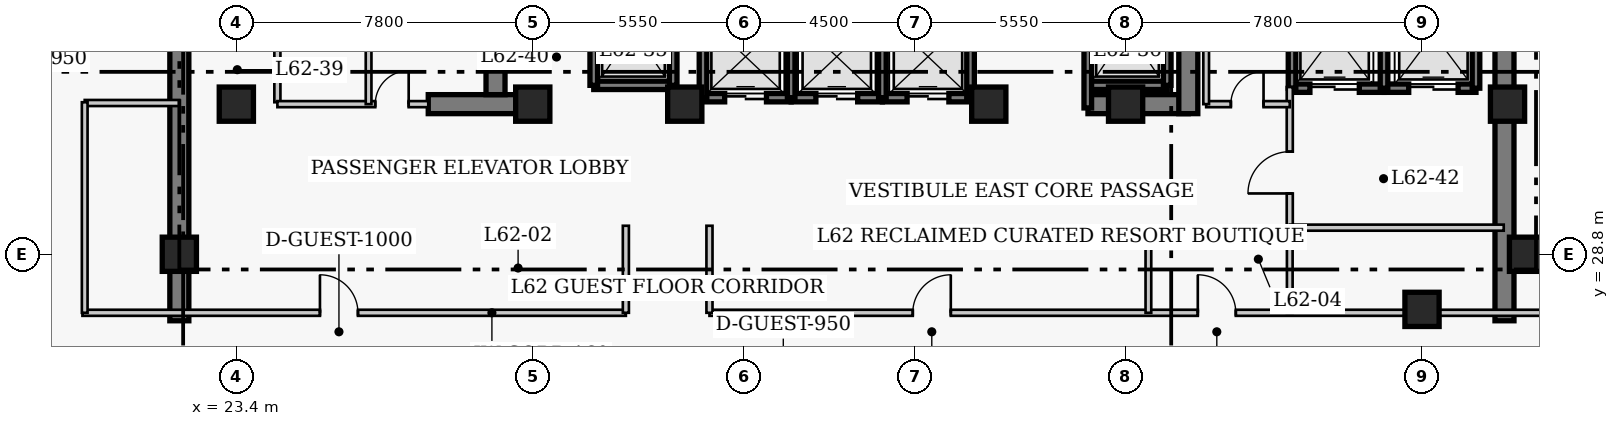
"""IFC4 building model, lengths in metres.
Left out: names, types, materials, properties, quantities, classifications, styles, units other than length and angle.
Written with IfcOpenShell. Run it as: python <this file> out.ifc"""

import sys

from ifc_helpers import new_model, si_unit, direction, frame, frame_2d, origin, origin_2d, place, context, subcontext, project, spatial, rectangle, extrude, element, fill, save


model = new_model("IFC4")
c1 = context("Model", 3, precision=1e-05, world=origin(), true_north=direction((0.0, 1.0)))
c2 = subcontext(c1, "Body", "Model", "MODEL_VIEW")
j1 = project(units=[si_unit("LENGTHUNIT", "METRE"), si_unit("PLANEANGLEUNIT", "RADIAN")], contexts=[c1])
p1 = place(None, origin())
s1 = spatial("IfcSite", under=j1, at=p1, CompositionType="ELEMENT")
p2 = place(p1, origin())
s2 = spatial("IfcBuilding", under=s1, at=p2, CompositionType="ELEMENT")
p3 = place(p2, frame((0.0, 0.0, 249.4)))
s3 = spatial("IfcBuildingStorey", under=s2, at=p3, CompositionType="ELEMENT", Elevation=249.4)
for number, where, z_axis, x_axis in (
    (1, (21.9, 27.05, 0.0), (0.0, 0.0, 1.0), (0.0, 1.0, 0.0)),
    (2, (56.77, 27.05, 0.0), (0.0, 0.0, 1.0), (0.0, 1.0, 0.0)),
):
    element("IfcWall", number, at=place(p3, frame(where, z_axis=z_axis, x_axis=x_axis)), inside=s3, PredefinedType="SHEAR", context=c2, shape_type="SweptSolid", body=[
        extrude(rectangle(XDim=13.52, YDim=0.5, at=frame_2d((6.76, 0.0))), origin(), (0.0, 0.0, 1.0), 4.0),
    ])
p4 = place(p3, frame((28.45, 32.75, 0.0), z_axis=(0.0, 0.0, 1.0), x_axis=(1.0, 0.0, 0.0)))
e3 = element("IfcWall", 3, at=p4, inside=s3, PredefinedType="SHEAR", context=c2, shape_type="SweptSolid", body=[
    extrude(rectangle(XDim=2.4, YDim=0.5, at=frame_2d((1.2, 0.0))), origin(), (0.0, 0.0, 1.0), 4.0),
])
p5 = place(p3, frame((45.81, 32.75, 0.0), z_axis=(0.0, 0.0, 1.0), x_axis=(1.0, 0.0, 0.0)))
e4 = element("IfcWall", 4, at=p5, inside=s3, PredefinedType="SHEAR", context=c2, shape_type="SweptSolid", body=[
    extrude(rectangle(XDim=2.64, YDim=0.5, at=frame_2d((1.32, 0.0))), origin(), (0.0, 0.0, 1.0), 4.0),
])
p6 = place(p3, frame((30.22, 33.0, 0.0), z_axis=(0.0, 0.0, 1.0), x_axis=(0.0, 1.0, 0.0)))
e5 = element("IfcWall", 5, at=p6, inside=s3, PredefinedType="SHEAR", context=c2, shape_type="SweptSolid", body=[
    extrude(rectangle(XDim=7.32, YDim=0.5, at=frame_2d((3.66, 0.0))), origin(), (0.0, 0.0, 1.0), 4.0),
])
p7 = place(p3, frame((48.45, 32.5, 0.0), z_axis=(0.0, 0.0, 1.0), x_axis=(0.0, 1.0, 0.0)))
e6 = element("IfcWall", 6, at=p7, inside=s3, PredefinedType="SHEAR", context=c2, shape_type="SweptSolid", body=[
    extrude(rectangle(XDim=7.82, YDim=0.5, at=frame_2d((3.91, 0.0))), origin(), (0.0, 0.0, 1.0), 4.0),
])
p8 = place(p7, frame((5.7, 0.0, 0.0)))
e7 = element("IfcOpeningElement", 7, at=p8, cuts=e6, PredefinedType="OPENING", context=c2, shape_type="SweptSolid", body=[
    extrude(rectangle(XDim=1.1, YDim=2.15, at=frame_2d((0.55, 1.075))), frame((0.0, 0.26, 0.0), z_axis=(0.0, -1.0, 0.0), x_axis=(1.0, 0.0, 0.0)), (0.0, 0.0, 1.0), 0.52),
])
for number, where, z_axis, x_axis in (
    (8, (21.9, 28.8, 0.0), (0.0, 0.0, 1.0), (1.0, 0.0, 0.0)),
    (9, (57.35, 28.8, 0.0), (0.0, 0.0, 1.0), (1.0, 0.0, 0.0)),
    (10, (23.4, 32.75, 0.0), (0.0, 0.0, 1.0), (1.0, 0.0, 0.0)),
    (11, (31.2, 32.75, 0.0), (0.0, 0.0, 1.0), (1.0, 0.0, 0.0)),
    (12, (35.2, 32.75, 0.0), (0.0, 0.0, 1.0), (1.0, 0.0, 0.0)),
    (13, (43.2, 32.75, 0.0), (0.0, 0.0, 1.0), (1.0, 0.0, 0.0)),
    (14, (46.8, 32.75, 0.0), (0.0, 0.0, 1.0), (1.0, 0.0, 0.0)),
    (15, (54.6, 27.35, 0.0), (0.0, 0.0, 1.0), (1.0, 0.0, 0.0)),
    (16, (56.85, 32.75, 0.0), (0.0, 0.0, 1.0), (1.0, 0.0, 0.0)),
):
    element("IfcColumn", number, at=place(p3, frame(where, z_axis=z_axis, x_axis=x_axis)), inside=s3, PredefinedType="COLUMN", context=c2, shape_type="SweptSolid", body=[
        extrude(rectangle(XDim=0.9, YDim=0.9, at=origin_2d()), origin(), (0.0, 0.0, 1.0), 4.0),
    ])
p9 = place(p3, frame((35.68, 32.92, 0.0), z_axis=(0.0, 0.0, 1.0), x_axis=(1.0, 0.0, 0.0)))
e17 = element("IfcWall", 17, at=p9, inside=s3, PredefinedType="SHEAR", context=c2, shape_type="SweptSolid", body=[
    extrude(rectangle(XDim=2.32, YDim=0.22, at=frame_2d((1.16, 0.0))), origin(), (0.0, 0.0, 1.0), 4.0),
])
p10 = place(p9, frame((0.57, 0.0, 0.0)))
e18 = element("IfcOpeningElement", 18, at=p10, cuts=e17, PredefinedType="OPENING", context=c2, shape_type="SweptSolid", body=[
    extrude(rectangle(XDim=1.1, YDim=2.15, at=frame_2d((0.55, 1.075))), frame((0.0, 0.12, 0.0), z_axis=(0.0, -1.0, 0.0), x_axis=(1.0, 0.0, 0.0)), (0.0, 0.0, 1.0), 0.24),
])
p11 = place(p3, frame((35.68, 32.92, 0.0), z_axis=(0.0, 0.0, 1.0), x_axis=(0.0, 1.0, 0.0)))
e19 = element("IfcWall", 19, at=p11, inside=s3, PredefinedType="SHEAR", context=c2, shape_type="SweptSolid", body=[
    extrude(rectangle(XDim=2.16, YDim=0.2, at=frame_2d((1.08, 0.0))), origin(), (0.0, 0.0, 1.0), 4.0),
])
p12 = place(p3, frame((38.0, 32.92, 0.0), z_axis=(0.0, 0.0, 1.0), x_axis=(1.0, 0.0, 0.0)))
e20 = element("IfcWall", 20, at=p12, inside=s3, PredefinedType="SHEAR", context=c2, shape_type="SweptSolid", body=[
    extrude(rectangle(XDim=2.4, YDim=0.22, at=frame_2d((1.2, 0.0))), origin(), (0.0, 0.0, 1.0), 4.0),
])
p13 = place(p12, frame((0.65, 0.0, 0.0)))
e21 = element("IfcOpeningElement", 21, at=p13, cuts=e20, PredefinedType="OPENING", context=c2, shape_type="SweptSolid", body=[
    extrude(rectangle(XDim=1.1, YDim=2.15, at=frame_2d((0.55, 1.075))), frame((0.0, 0.12, 0.0), z_axis=(0.0, -1.0, 0.0), x_axis=(1.0, 0.0, 0.0)), (0.0, 0.0, 1.0), 0.24),
])
p14 = place(p3, frame((38.0, 32.92, 0.0), z_axis=(0.0, 0.0, 1.0), x_axis=(0.0, 1.0, 0.0)))
e22 = element("IfcWall", 22, at=p14, inside=s3, PredefinedType="SHEAR", context=c2, shape_type="SweptSolid", body=[
    extrude(rectangle(XDim=2.16, YDim=0.2, at=frame_2d((1.08, 0.0))), origin(), (0.0, 0.0, 1.0), 4.0),
])
p15 = place(p3, frame((40.4, 32.92, 0.0), z_axis=(0.0, 0.0, 1.0), x_axis=(1.0, 0.0, 0.0)))
e23 = element("IfcWall", 23, at=p15, inside=s3, PredefinedType="SHEAR", context=c2, shape_type="SweptSolid", body=[
    extrude(rectangle(XDim=2.32, YDim=0.22, at=frame_2d((1.16, 0.0))), origin(), (0.0, 0.0, 1.0), 4.0),
])
p16 = place(p15, frame((0.65, 0.0, 0.0)))
e24 = element("IfcOpeningElement", 24, at=p16, cuts=e23, PredefinedType="OPENING", context=c2, shape_type="SweptSolid", body=[
    extrude(rectangle(XDim=1.1, YDim=2.15, at=frame_2d((0.55, 1.075))), frame((0.0, 0.12, 0.0), z_axis=(0.0, -1.0, 0.0), x_axis=(1.0, 0.0, 0.0)), (0.0, 0.0, 1.0), 0.24),
])
for number, where, z_axis, x_axis in (
    (25, (40.4, 32.92, 0.0), (0.0, 0.0, 1.0), (0.0, 1.0, 0.0)),
    (26, (42.72, 32.92, 0.0), (0.0, 0.0, 1.0), (0.0, 1.0, 0.0)),
):
    element("IfcWall", number, at=place(p3, frame(where, z_axis=z_axis, x_axis=x_axis)), inside=s3, PredefinedType="SHEAR", context=c2, shape_type="SweptSolid", body=[
        extrude(rectangle(XDim=2.16, YDim=0.2, at=frame_2d((1.08, 0.0))), origin(), (0.0, 0.0, 1.0), 4.0),
    ])
p17 = place(p3, frame((51.18, 33.17, 0.0), z_axis=(0.0, 0.0, 1.0), x_axis=(1.0, 0.0, 0.0)))
e27 = element("IfcWall", 27, at=p17, inside=s3, PredefinedType="SHEAR", context=c2, shape_type="SweptSolid", body=[
    extrude(rectangle(XDim=2.42, YDim=0.22, at=frame_2d((1.21, 0.0))), origin(), (0.0, 0.0, 1.0), 4.0),
])
p18 = place(p17, frame((0.47, 0.0, 0.0)))
e28 = element("IfcOpeningElement", 28, at=p18, cuts=e27, PredefinedType="OPENING", context=c2, shape_type="SweptSolid", body=[
    extrude(rectangle(XDim=1.3, YDim=2.15, at=frame_2d((0.65, 1.075))), frame((0.0, 0.12, 0.0), z_axis=(0.0, -1.0, 0.0), x_axis=(1.0, 0.0, 0.0)), (0.0, 0.0, 1.0), 0.24),
])
p19 = place(p3, frame((51.18, 33.17, 0.0), z_axis=(0.0, 0.0, 1.0), x_axis=(0.0, 1.0, 0.0)))
e29 = element("IfcWall", 29, at=p19, inside=s3, PredefinedType="SHEAR", context=c2, shape_type="SweptSolid", body=[
    extrude(rectangle(XDim=2.86, YDim=0.2, at=frame_2d((1.43, 0.0))), origin(), (0.0, 0.0, 1.0), 4.0),
])
p20 = place(p3, frame((53.6, 33.17, 0.0), z_axis=(0.0, 0.0, 1.0), x_axis=(1.0, 0.0, 0.0)))
e30 = element("IfcWall", 30, at=p20, inside=s3, PredefinedType="SHEAR", context=c2, shape_type="SweptSolid", body=[
    extrude(rectangle(XDim=2.42, YDim=0.22, at=frame_2d((1.21, 0.0))), origin(), (0.0, 0.0, 1.0), 4.0),
])
p21 = place(p20, frame((0.65, 0.0, 0.0)))
e31 = element("IfcOpeningElement", 31, at=p21, cuts=e30, PredefinedType="OPENING", context=c2, shape_type="SweptSolid", body=[
    extrude(rectangle(XDim=1.3, YDim=2.15, at=frame_2d((0.65, 1.075))), frame((0.0, 0.12, 0.0), z_axis=(0.0, -1.0, 0.0), x_axis=(1.0, 0.0, 0.0)), (0.0, 0.0, 1.0), 0.24),
])
for number, where, z_axis, x_axis in (
    (32, (53.6, 33.17, 0.0), (0.0, 0.0, 1.0), (0.0, 1.0, 0.0)),
    (33, (56.02, 33.17, 0.0), (0.0, 0.0, 1.0), (0.0, 1.0, 0.0)),
):
    element("IfcWall", number, at=place(p3, frame(where, z_axis=z_axis, x_axis=x_axis)), inside=s3, PredefinedType="SHEAR", context=c2, shape_type="SweptSolid", body=[
        extrude(rectangle(XDim=2.86, YDim=0.2, at=frame_2d((1.43, 0.0))), origin(), (0.0, 0.0, 1.0), 4.0),
    ])
p22 = place(p3, frame((32.805, 33.245, 0.0), z_axis=(0.0, 0.0, 1.0), x_axis=(1.0, 0.0, 0.0)))
e34 = element("IfcWall", 34, at=p22, inside=s3, PredefinedType="SHEAR", context=c2, shape_type="SweptSolid", body=[
    extrude(rectangle(XDim=2.09, YDim=0.22, at=frame_2d((1.045, 0.0))), origin(), (0.0, 0.0, 1.0), 4.0),
])
for number, where, z_axis, x_axis in (
    (35, (32.805, 33.245, 0.0), (0.0, 0.0, 1.0), (0.0, 1.0, 0.0)),
    (36, (34.895, 33.245, 0.0), (0.0, 0.0, 1.0), (0.0, 1.0, 0.0)),
):
    element("IfcWall", number, at=place(p3, frame(where, z_axis=z_axis, x_axis=x_axis)), inside=s3, PredefinedType="SHEAR", context=c2, shape_type="SweptSolid", body=[
        extrude(rectangle(XDim=2.91, YDim=0.2, at=frame_2d((1.455, 0.0))), origin(), (0.0, 0.0, 1.0), 4.0),
    ])
p23 = place(p3, frame((45.805, 33.245, 0.0), z_axis=(0.0, 0.0, 1.0), x_axis=(1.0, 0.0, 0.0)))
e37 = element("IfcWall", 37, at=p23, inside=s3, PredefinedType="SHEAR", context=c2, shape_type="SweptSolid", body=[
    extrude(rectangle(XDim=2.09, YDim=0.22, at=frame_2d((1.045, 0.0))), origin(), (0.0, 0.0, 1.0), 4.0),
])
p24 = place(p3, frame((45.805, 32.65, 0.0), z_axis=(0.0, 0.0, 1.0), x_axis=(0.0, 1.0, 0.0)))
e38 = element("IfcWall", 38, at=p24, inside=s3, PredefinedType="SHEAR", context=c2, shape_type="SweptSolid", body=[
    extrude(rectangle(XDim=3.505, YDim=0.2, at=frame_2d((1.752, 0.0))), origin(), (0.0, 0.0, 1.0), 4.0),
])
p25 = place(p3, frame((47.895, 33.245, 0.0), z_axis=(0.0, 0.0, 1.0), x_axis=(0.0, 1.0, 0.0)))
e39 = element("IfcWall", 39, at=p25, inside=s3, PredefinedType="SHEAR", context=c2, shape_type="SweptSolid", body=[
    extrude(rectangle(XDim=2.91, YDim=0.2, at=frame_2d((1.455, 0.0))), origin(), (0.0, 0.0, 1.0), 4.0),
])
p26 = place(p3, frame((24.48, 32.8, 0.0), z_axis=(0.0, 0.0, 1.0), x_axis=(0.0, 1.0, 0.0)))
e40 = element("IfcWall", 40, at=p26, inside=s3, PredefinedType="PARTITIONING", context=c2, shape_type="SweptSolid", body=[
    extrude(rectangle(XDim=3.57, YDim=0.16, at=frame_2d((1.785, 0.0))), origin(), (0.0, 0.0, 1.0), 3.76),
])
p27 = place(p26, frame((1.604, 0.0, 0.0)))
e41 = element("IfcOpeningElement", 41, at=p27, cuts=e40, PredefinedType="OPENING", context=c2, shape_type="SweptSolid", body=[
    extrude(rectangle(XDim=0.9, YDim=2.1, at=frame_2d((0.45, 1.05))), frame((0.0, 0.09, 0.0), z_axis=(0.0, -1.0, 0.0), x_axis=(1.0, 0.0, 0.0)), (0.0, 0.0, 1.0), 0.18),
])
p28 = place(p3, frame((51.12, 29.5, 0.0), z_axis=(0.0, 0.0, 1.0), x_axis=(0.0, 1.0, 0.0)))
e42 = element("IfcWall", 42, at=p28, inside=s3, PredefinedType="PARTITIONING", context=c2, shape_type="SweptSolid", body=[
    extrude(rectangle(XDim=3.7, YDim=0.16, at=frame_2d((1.85, 0.0))), origin(), (0.0, 0.0, 1.0), 3.76),
])
p29 = place(p28, frame((0.9, 0.0, 0.0)))
e43 = element("IfcOpeningElement", 43, at=p29, cuts=e42, PredefinedType="OPENING", context=c2, shape_type="SweptSolid", body=[
    extrude(rectangle(XDim=1.1, YDim=2.15, at=frame_2d((0.55, 1.075))), frame((0.0, 0.09, 0.0), z_axis=(0.0, -1.0, 0.0), x_axis=(1.0, 0.0, 0.0)), (0.0, 0.0, 1.0), 0.18),
])
p30 = place(p3, frame((51.12, 29.5, 0.0), z_axis=(0.0, 0.0, 1.0), x_axis=(1.0, 0.0, 0.0)))
e44 = element("IfcWall", 44, at=p30, inside=s3, PredefinedType="PARTITIONING", context=c2, shape_type="SweptSolid", body=[
    extrude(rectangle(XDim=5.63, YDim=0.16, at=frame_2d((2.815, 0.0))), origin(), (0.0, 0.0, 1.0), 3.76),
])
p31 = place(p3, frame((24.48, 32.75, 0.0), z_axis=(0.0, 0.0, 1.0), x_axis=(1.0, 0.0, 0.0)))
e45 = element("IfcWall", 45, at=p31, inside=s3, PredefinedType="PARTITIONING", context=c2, shape_type="SweptSolid", body=[
    extrude(rectangle(XDim=3.97, YDim=0.16, at=frame_2d((1.985, 0.0))), origin(), (0.0, 0.0, 1.0), 3.76),
])
p32 = place(p31, frame((2.575, 0.0, 0.0)))
e46 = element("IfcOpeningElement", 46, at=p32, cuts=e45, PredefinedType="OPENING", context=c2, shape_type="SweptSolid", body=[
    extrude(rectangle(XDim=0.88, YDim=2.05, at=frame_2d((0.44, 1.025))), frame((0.0, 0.09, 0.0), z_axis=(0.0, -1.0, 0.0), x_axis=(1.0, 0.0, 0.0)), (0.0, 0.0, 1.0), 0.18),
])
p33 = place(p3, frame((48.92, 32.75, 0.0), z_axis=(0.0, 0.0, 1.0), x_axis=(1.0, 0.0, 0.0)))
e47 = element("IfcWall", 47, at=p33, inside=s3, PredefinedType="PARTITIONING", context=c2, shape_type="SweptSolid", body=[
    extrude(rectangle(XDim=2.2, YDim=0.16, at=frame_2d((1.1, 0.0))), origin(), (0.0, 0.0, 1.0), 3.76),
])
p34 = place(p33, frame((0.65, 0.0, 0.0)))
e48 = element("IfcOpeningElement", 48, at=p34, cuts=e47, PredefinedType="OPENING", context=c2, shape_type="SweptSolid", body=[
    extrude(rectangle(XDim=0.86, YDim=2.05, at=frame_2d((0.43, 1.025))), frame((0.0, 0.09, 0.0), z_axis=(0.0, -1.0, 0.0), x_axis=(1.0, 0.0, 0.0)), (0.0, 0.0, 1.0), 0.18),
])
for number, where, z_axis, x_axis in (
    (49, (48.92, 32.75, 0.0), (0.0, 0.0, 1.0), (0.0, 1.0, 0.0)),
    (50, (26.88, 32.75, 0.0), (0.0, 0.0, 1.0), (0.0, 1.0, 0.0)),
):
    element("IfcWall", number, at=place(p3, frame(where, z_axis=z_axis, x_axis=x_axis)), inside=s3, PredefinedType="PARTITIONING", context=c2, shape_type="SweptSolid", body=[
        extrude(rectangle(XDim=3.62, YDim=0.15, at=frame_2d((1.81, 0.0))), origin(), (0.0, 0.0, 1.0), 3.76),
    ])
p35 = place(p3, frame((19.35, 27.26, 0.0), z_axis=(0.0, 0.0, 1.0), x_axis=(1.0, 0.0, 0.0)))
e51 = element("IfcWall", 51, at=p35, inside=s3, PredefinedType="PARTITIONING", context=c2, shape_type="SweptSolid", body=[
    extrude(rectangle(XDim=14.3, YDim=0.16, at=frame_2d((7.15, 0.0))), origin(), (0.0, 0.0, 1.0), 3.76),
])
p36 = place(p35, frame((6.25, 0.0, 0.0)))
e52 = element("IfcOpeningElement", 52, at=p36, cuts=e51, PredefinedType="OPENING", context=c2, shape_type="SweptSolid", body=[
    extrude(rectangle(XDim=1.0, YDim=2.15, at=frame_2d((0.5, 1.075))), frame((0.0, 0.09, 0.0), z_axis=(0.0, -1.0, 0.0), x_axis=(1.0, 0.0, 0.0)), (0.0, 0.0, 1.0), 0.18),
])
p37 = place(p3, frame((35.85, 27.26, 0.0), z_axis=(0.0, 0.0, 1.0), x_axis=(1.0, 0.0, 0.0)))
e53 = element("IfcWall", 53, at=p37, inside=s3, PredefinedType="PARTITIONING", context=c2, shape_type="SweptSolid", body=[
    extrude(rectangle(XDim=23.15, YDim=0.16, at=frame_2d((11.575, 0.0))), origin(), (0.0, 0.0, 1.0), 3.76),
])
p38 = place(p37, frame((5.35, 0.0, 0.0)))
e54 = element("IfcOpeningElement", 54, at=p38, cuts=e53, PredefinedType="OPENING", context=c2, shape_type="SweptSolid", body=[
    extrude(rectangle(XDim=1.0, YDim=2.15, at=frame_2d((0.5, 1.075))), frame((0.0, 0.09, 0.0), z_axis=(0.0, -1.0, 0.0), x_axis=(1.0, 0.0, 0.0)), (0.0, 0.0, 1.0), 0.18),
])
p39 = place(p37, frame((12.85, 0.0, 0.0)))
e55 = element("IfcOpeningElement", 55, at=p39, cuts=e53, PredefinedType="OPENING", context=c2, shape_type="SweptSolid", body=[
    extrude(rectangle(XDim=1.0, YDim=2.15, at=frame_2d((0.5, 1.075))), frame((0.0, 0.09, 0.0), z_axis=(0.0, -1.0, 0.0), x_axis=(1.0, 0.0, 0.0)), (0.0, 0.0, 1.0), 0.18),
])
for number, where, z_axis, x_axis in (
    (56, (33.65, 27.26, 0.0), (0.0, 0.0, 1.0), (0.0, 1.0, 0.0)),
    (57, (35.85, 27.26, 0.0), (0.0, 0.0, 1.0), (0.0, 1.0, 0.0)),
):
    element("IfcWall", number, at=place(p3, frame(where, z_axis=z_axis, x_axis=x_axis)), inside=s3, PredefinedType="PARTITIONING", context=c2, shape_type="SweptSolid", body=[
        extrude(rectangle(XDim=2.29, YDim=0.16, at=frame_2d((1.145, 0.0))), origin(), (0.0, 0.0, 1.0), 3.76),
    ])
p40 = place(p3, frame((19.41, 32.78, 0.0), z_axis=(0.0, 0.0, 1.0), x_axis=(1.0, 0.0, 0.0)))
e58 = element("IfcWall", 58, at=p40, inside=s3, PredefinedType="PARTITIONING", context=c2, shape_type="SweptSolid", body=[
    extrude(rectangle(XDim=2.49, YDim=0.16, at=frame_2d((1.245, 0.0))), origin(), (0.0, 0.0, 1.0), 3.76),
])
p41 = place(p3, frame((19.41, 27.26, 0.0), z_axis=(0.0, 0.0, 1.0), x_axis=(0.0, 1.0, 0.0)))
e59 = element("IfcWall", 59, at=p41, inside=s3, PredefinedType="PARTITIONING", context=c2, shape_type="SweptSolid", body=[
    extrude(rectangle(XDim=5.54, YDim=0.15, at=frame_2d((2.77, 0.0))), origin(), (0.0, 0.0, 1.0), 3.76),
])
for number, where, z_axis, x_axis in (
    (60, (47.4, 27.26, 0.0), (0.0, 0.0, 1.0), (0.0, 1.0, 0.0)),
    (61, (51.12, 27.26, 0.0), (0.0, 0.0, 1.0), (0.0, 1.0, 0.0)),
):
    element("IfcWall", number, at=place(p3, frame(where, z_axis=z_axis, x_axis=x_axis)), inside=s3, PredefinedType="PARTITIONING", context=c2, shape_type="SweptSolid", body=[
        extrude(rectangle(XDim=2.29, YDim=0.15, at=frame_2d((1.145, 0.0))), origin(), (0.0, 0.0, 1.0), 3.76),
    ])
p42 = place(p10, origin())
e62 = element("IfcDoor", 62, at=p42, inside=s3, OperationType="DOUBLE_DOOR_SLIDING", PredefinedType="DOOR", context=c2, shape_type="SweptSolid", body=[
    extrude(rectangle(XDim=1.1, YDim=2.15, at=frame_2d((0.55, 1.075))), frame((0.0, 0.025, 0.0), z_axis=(0.0, -1.0, 0.0), x_axis=(1.0, 0.0, 0.0)), (0.0, 0.0, 1.0), 0.05),
])
fill(e18, e62)
p43 = place(p13, origin())
e63 = element("IfcDoor", 63, at=p43, inside=s3, OperationType="DOUBLE_DOOR_SLIDING", PredefinedType="DOOR", context=c2, shape_type="SweptSolid", body=[
    extrude(rectangle(XDim=1.1, YDim=2.15, at=frame_2d((0.55, 1.075))), frame((0.0, 0.025, 0.0), z_axis=(0.0, -1.0, 0.0), x_axis=(1.0, 0.0, 0.0)), (0.0, 0.0, 1.0), 0.05),
])
fill(e21, e63)
p44 = place(p16, origin())
e64 = element("IfcDoor", 64, at=p44, inside=s3, OperationType="DOUBLE_DOOR_SLIDING", PredefinedType="DOOR", context=c2, shape_type="SweptSolid", body=[
    extrude(rectangle(XDim=1.1, YDim=2.15, at=frame_2d((0.55, 1.075))), frame((0.0, 0.025, 0.0), z_axis=(0.0, -1.0, 0.0), x_axis=(1.0, 0.0, 0.0)), (0.0, 0.0, 1.0), 0.05),
])
fill(e24, e64)
p45 = place(p18, origin())
e65 = element("IfcDoor", 65, at=p45, inside=s3, OperationType="DOUBLE_DOOR_SLIDING", PredefinedType="DOOR", context=c2, shape_type="SweptSolid", body=[
    extrude(rectangle(XDim=1.3, YDim=2.15, at=frame_2d((0.65, 1.075))), frame((0.0, 0.025, 0.0), z_axis=(0.0, -1.0, 0.0), x_axis=(1.0, 0.0, 0.0)), (0.0, 0.0, 1.0), 0.05),
])
fill(e28, e65)
p46 = place(p21, origin())
e66 = element("IfcDoor", 66, at=p46, inside=s3, OperationType="DOUBLE_DOOR_SLIDING", PredefinedType="DOOR", context=c2, shape_type="SweptSolid", body=[
    extrude(rectangle(XDim=1.3, YDim=2.15, at=frame_2d((0.65, 1.075))), frame((0.0, 0.025, 0.0), z_axis=(0.0, -1.0, 0.0), x_axis=(1.0, 0.0, 0.0)), (0.0, 0.0, 1.0), 0.05),
])
fill(e31, e66)
p47 = place(p29, origin())
e67 = element("IfcDoor", 67, at=p47, inside=s3, OperationType="SINGLE_SWING_LEFT", PredefinedType="DOOR", context=c2, shape_type="SweptSolid", body=[
    extrude(rectangle(XDim=1.1, YDim=2.15, at=frame_2d((0.55, 1.075))), frame((0.0, 0.025, 0.0), z_axis=(0.0, -1.0, 0.0), x_axis=(1.0, 0.0, 0.0)), (0.0, 0.0, 1.0), 0.05),
])
fill(e43, e67)
p48 = place(p32, origin())
e68 = element("IfcDoor", 68, at=p48, inside=s3, OperationType="SINGLE_SWING_RIGHT", PredefinedType="DOOR", context=c2, shape_type="SweptSolid", body=[
    extrude(rectangle(XDim=0.88, YDim=2.05, at=frame_2d((0.44, 1.025))), frame((0.0, 0.025, 0.0), z_axis=(0.0, -1.0, 0.0), x_axis=(1.0, 0.0, 0.0)), (0.0, 0.0, 1.0), 0.05),
])
fill(e46, e68)
p49 = place(p34, origin())
e69 = element("IfcDoor", 69, at=p49, inside=s3, OperationType="SINGLE_SWING_RIGHT", PredefinedType="DOOR", context=c2, shape_type="SweptSolid", body=[
    extrude(rectangle(XDim=0.86, YDim=2.05, at=frame_2d((0.43, 1.025))), frame((0.0, 0.025, 0.0), z_axis=(0.0, -1.0, 0.0), x_axis=(1.0, 0.0, 0.0)), (0.0, 0.0, 1.0), 0.05),
])
fill(e48, e69)
p50 = place(p36, origin())
e70 = element("IfcDoor", 70, at=p50, inside=s3, OperationType="SINGLE_SWING_LEFT", PredefinedType="DOOR", context=c2, shape_type="SweptSolid", body=[
    extrude(rectangle(XDim=1.0, YDim=2.15, at=frame_2d((0.5, 1.075))), frame((0.0, 0.025, 0.0), z_axis=(0.0, -1.0, 0.0), x_axis=(1.0, 0.0, 0.0)), (0.0, 0.0, 1.0), 0.05),
])
fill(e52, e70)
p51 = place(p38, origin())
e71 = element("IfcDoor", 71, at=p51, inside=s3, OperationType="SINGLE_SWING_RIGHT", PredefinedType="DOOR", context=c2, shape_type="SweptSolid", body=[
    extrude(rectangle(XDim=1.0, YDim=2.15, at=frame_2d((0.5, 1.075))), frame((0.0, 0.025, 0.0), z_axis=(0.0, -1.0, 0.0), x_axis=(1.0, 0.0, 0.0)), (0.0, 0.0, 1.0), 0.05),
])
fill(e54, e71)
p52 = place(p39, origin())
e72 = element("IfcDoor", 72, at=p52, inside=s3, OperationType="SINGLE_SWING_LEFT", PredefinedType="DOOR", context=c2, shape_type="SweptSolid", body=[
    extrude(rectangle(XDim=1.0, YDim=2.15, at=frame_2d((0.5, 1.075))), frame((0.0, 0.025, 0.0), z_axis=(0.0, -1.0, 0.0), x_axis=(1.0, 0.0, 0.0)), (0.0, 0.0, 1.0), 0.05),
])
fill(e55, e72)
save(model, sys.argv[1])
